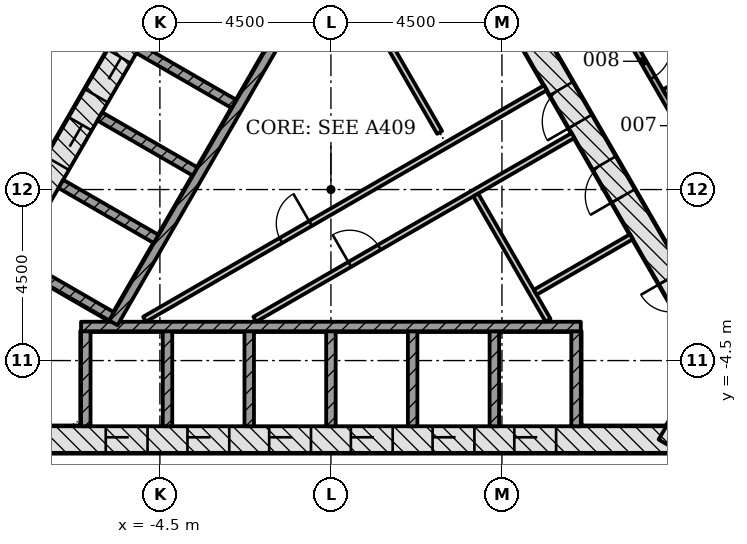
"""IFC4 building model, lengths in metres.
Left out: names, types, materials, properties, quantities, classifications, styles, units other than length and angle.
Written with IfcOpenShell. Run it as: python <this file> out.ifc"""

import sys

from ifc_helpers import new_model, si_unit, direction, frame, frame_2d, origin, place, context, subcontext, project, spatial, rectangle, extrude, element, fill, save


model = new_model("IFC4")
c1 = context("Model", 3, precision=1e-05, world=origin(), true_north=direction((0.0, 1.0)))
c2 = subcontext(c1, "Body", "Model", "MODEL_VIEW")
j1 = project(units=[si_unit("LENGTHUNIT", "METRE"), si_unit("PLANEANGLEUNIT", "RADIAN")], contexts=[c1])
p1 = place(None, origin())
s1 = spatial("IfcSite", under=j1, at=p1, CompositionType="ELEMENT")
p2 = place(p1, origin())
s2 = spatial("IfcBuilding", under=s1, at=p2, CompositionType="ELEMENT")
p3 = place(p2, frame((0.0, 0.0, 58.2)))
s3 = spatial("IfcBuildingStorey", under=s2, at=p3, CompositionType="ELEMENT", Elevation=58.2)
p4 = place(p3, frame((-9.229, -6.578, -0.2), z_axis=(0.0, 0.0, 1.0), x_axis=(1.0, 0.0, 0.0)))
e1 = element("IfcWall", 1, at=p4, inside=s3, PredefinedType="SHEAR", context=c2, shape_type="SweptSolid", body=[
    extrude(rectangle(XDim=18.458, YDim=0.7, at=frame_2d((9.229, 0.0))), origin(), (0.0, 0.0, 1.0), 3.6),
])
p5 = place(p4, frame((3.304, 0.0, 0.2)))
e2 = element("IfcOpeningElement", 2, at=p5, cuts=e1, PredefinedType="OPENING", context=c2, shape_type="SweptSolid", body=[
    extrude(rectangle(XDim=1.1, YDim=2.1, at=frame_2d((0.55, 1.05))), frame((0.0, 0.36, 0.0), z_axis=(0.0, -1.0, 0.0), x_axis=(1.0, 0.0, 0.0)), (0.0, 0.0, 1.0), 0.72),
])
p6 = place(p4, frame((5.454, 0.0, 0.2)))
e3 = element("IfcOpeningElement", 3, at=p6, cuts=e1, PredefinedType="OPENING", context=c2, shape_type="SweptSolid", body=[
    extrude(rectangle(XDim=1.1, YDim=2.1, at=frame_2d((0.55, 1.05))), frame((0.0, 0.36, 0.0), z_axis=(0.0, -1.0, 0.0), x_axis=(1.0, 0.0, 0.0)), (0.0, 0.0, 1.0), 0.72),
])
p7 = place(p4, frame((7.604, 0.0, 0.2)))
e4 = element("IfcOpeningElement", 4, at=p7, cuts=e1, PredefinedType="OPENING", context=c2, shape_type="SweptSolid", body=[
    extrude(rectangle(XDim=1.1, YDim=2.1, at=frame_2d((0.55, 1.05))), frame((0.0, 0.36, 0.0), z_axis=(0.0, -1.0, 0.0), x_axis=(1.0, 0.0, 0.0)), (0.0, 0.0, 1.0), 0.72),
])
p8 = place(p4, frame((9.754, 0.0, 0.2)))
e5 = element("IfcOpeningElement", 5, at=p8, cuts=e1, PredefinedType="OPENING", context=c2, shape_type="SweptSolid", body=[
    extrude(rectangle(XDim=1.1, YDim=2.1, at=frame_2d((0.55, 1.05))), frame((0.0, 0.36, 0.0), z_axis=(0.0, -1.0, 0.0), x_axis=(1.0, 0.0, 0.0)), (0.0, 0.0, 1.0), 0.72),
])
p9 = place(p4, frame((11.904, 0.0, 0.2)))
e6 = element("IfcOpeningElement", 6, at=p9, cuts=e1, PredefinedType="OPENING", context=c2, shape_type="SweptSolid", body=[
    extrude(rectangle(XDim=1.1, YDim=2.1, at=frame_2d((0.55, 1.05))), frame((0.0, 0.36, 0.0), z_axis=(0.0, -1.0, 0.0), x_axis=(1.0, 0.0, 0.0)), (0.0, 0.0, 1.0), 0.72),
])
p10 = place(p4, frame((14.054, 0.0, 0.2)))
e7 = element("IfcOpeningElement", 7, at=p10, cuts=e1, PredefinedType="OPENING", context=c2, shape_type="SweptSolid", body=[
    extrude(rectangle(XDim=1.1, YDim=2.1, at=frame_2d((0.55, 1.05))), frame((0.0, 0.36, 0.0), z_axis=(0.0, -1.0, 0.0), x_axis=(1.0, 0.0, 0.0)), (0.0, 0.0, 1.0), 0.72),
])
p11 = place(p4, frame((0.926, 0.0, 0.2)))
e8 = element("IfcOpeningElement", 8, at=p11, cuts=e1, PredefinedType="OPENING", context=c2, shape_type="SweptSolid", body=[
    extrude(rectangle(XDim=0.9, YDim=2.1, at=frame_2d((0.45, 1.05))), frame((0.0, 0.36, 0.0), z_axis=(0.0, -1.0, 0.0), x_axis=(1.0, 0.0, 0.0)), (0.0, 0.0, 1.0), 0.72),
])
p12 = place(p3, frame((8.926, -6.753, -0.2), z_axis=(0.0, 0.0, 1.0), x_axis=(0.500042739161, 0.866000726912, 0.0)))
e9 = element("IfcWall", 9, at=p12, inside=s3, PredefinedType="SHEAR", context=c2, shape_type="SweptSolid", body=[
    extrude(rectangle(XDim=2.771, YDim=0.7, at=frame_2d((1.386, 0.0))), origin(), (0.0, 0.0, 1.0), 3.6),
])
p13 = place(p3, frame((10.311, -4.703, -0.2), z_axis=(0.0, 0.0, 1.0), x_axis=(-0.500001446645, 0.866024568562, 0.0)))
e10 = element("IfcWall", 10, at=p13, inside=s3, PredefinedType="SHEAR", context=c2, shape_type="SweptSolid", body=[
    extrude(rectangle(XDim=18.458, YDim=0.7, at=frame_2d((9.229, 0.0))), origin(), (0.0, 0.0, 1.0), 3.6),
])
p14 = place(p13, frame((7.5, 0.0, 0.2)))
e11 = element("IfcOpeningElement", 11, at=p14, cuts=e10, PredefinedType="OPENING", context=c2, shape_type="SweptSolid", body=[
    extrude(rectangle(XDim=1.0, YDim=2.1, at=frame_2d((0.5, 1.05))), frame((0.0, 0.36, 0.0), z_axis=(0.0, -1.0, 0.0), x_axis=(1.0, 0.0, 0.0)), (0.0, 0.0, 1.0), 0.72),
])
p15 = place(p13, frame((1.852, 0.0, 0.2)))
e12 = element("IfcOpeningElement", 12, at=p15, cuts=e10, PredefinedType="OPENING", context=c2, shape_type="SweptSolid", body=[
    extrude(rectangle(XDim=0.9, YDim=2.1, at=frame_2d((0.45, 1.05))), frame((0.0, 0.36, 0.0), z_axis=(0.0, -1.0, 0.0), x_axis=(1.0, 0.0, 0.0)), (0.0, 0.0, 1.0), 0.72),
])
p16 = place(p13, frame((5.238, 0.0, 0.2)))
e13 = element("IfcOpeningElement", 13, at=p16, cuts=e10, PredefinedType="OPENING", context=c2, shape_type="SweptSolid", body=[
    extrude(rectangle(XDim=1.0, YDim=2.1, at=frame_2d((0.5, 1.05))), frame((0.0, 0.36, 0.0), z_axis=(0.0, -1.0, 0.0), x_axis=(1.0, 0.0, 0.0)), (0.0, 0.0, 1.0), 0.72),
])
p17 = place(p13, frame((13.63, 0.0, 0.2)))
e14 = element("IfcOpeningElement", 14, at=p17, cuts=e10, PredefinedType="OPENING", context=c2, shape_type="SweptSolid", body=[
    extrude(rectangle(XDim=0.9, YDim=2.1, at=frame_2d((0.45, 1.05))), frame((0.0, 0.36, 0.0), z_axis=(0.0, -1.0, 0.0), x_axis=(1.0, 0.0, 0.0)), (0.0, 0.0, 1.0), 0.72),
])
p18 = place(p3, frame((-1.083, 11.281, -0.2), z_axis=(0.0, 0.0, 1.0), x_axis=(-0.500001446645, -0.866024568562, 0.0)))
e15 = element("IfcWall", 15, at=p18, inside=s3, PredefinedType="SHEAR", context=c2, shape_type="SweptSolid", body=[
    extrude(rectangle(XDim=18.458, YDim=0.7, at=frame_2d((9.229, 0.0))), origin(), (0.0, 0.0, 1.0), 3.6),
])
p19 = place(p18, frame((8.979, 0.0, 0.2)))
e16 = element("IfcOpeningElement", 16, at=p19, cuts=e15, PredefinedType="OPENING", context=c2, shape_type="SweptSolid", body=[
    extrude(rectangle(XDim=1.2, YDim=2.1, at=frame_2d((0.6, 1.05))), frame((0.0, 0.36, 0.0), z_axis=(0.0, -1.0, 0.0), x_axis=(1.0, 0.0, 0.0)), (0.0, 0.0, 1.0), 0.72),
])
p20 = place(p18, frame((11.029, 0.0, 0.2)))
e17 = element("IfcOpeningElement", 17, at=p20, cuts=e15, PredefinedType="OPENING", context=c2, shape_type="SweptSolid", body=[
    extrude(rectangle(XDim=1.2, YDim=2.1, at=frame_2d((0.6, 1.05))), frame((0.0, 0.36, 0.0), z_axis=(0.0, -1.0, 0.0), x_axis=(1.0, 0.0, 0.0)), (0.0, 0.0, 1.0), 0.72),
])
for number, where, z_axis, x_axis in (
    (18, (-6.45, -6.228, -0.2), (0.0, 0.0, 1.0), (0.0, 1.0, 0.0)),
    (19, (-4.3, -6.228, -0.2), (0.0, 0.0, 1.0), (0.0, 1.0, 0.0)),
    (20, (-2.15, -6.228, -0.2), (0.0, 0.0, 1.0), (0.0, 1.0, 0.0)),
    (21, (0.0, -6.228, -0.2), (0.0, 0.0, 1.0), (0.0, 1.0, 0.0)),
    (22, (2.15, -6.228, -0.2), (0.0, 0.0, 1.0), (0.0, 1.0, 0.0)),
    (23, (4.3, -6.228, -0.2), (0.0, 0.0, 1.0), (0.0, 1.0, 0.0)),
    (24, (6.45, -6.228, -0.2), (0.0, 0.0, 1.0), (0.0, 1.0, 0.0)),
):
    element("IfcWall", number, at=place(p3, frame(where, z_axis=z_axis, x_axis=x_axis)), inside=s3, PredefinedType="PARTITIONING", context=c2, shape_type="SweptSolid", body=[
        extrude(rectangle(XDim=2.5, YDim=0.25, at=frame_2d((1.25, 0.0))), origin(), (0.0, 0.0, 1.0), 3.6),
    ])
p21 = place(p3, frame((-6.575, -3.603, 0.0), z_axis=(0.0, 0.0, 1.0), x_axis=(1.0, 0.0, 0.0)))
e25 = element("IfcWall", 25, at=p21, inside=s3, PredefinedType="PARTITIONING", context=c2, shape_type="SweptSolid", body=[
    extrude(rectangle(XDim=13.15, YDim=0.25, at=frame_2d((6.575, 0.0))), origin(), (0.0, 0.0, 1.0), 3.4),
])
for number, where, z_axis, x_axis in (
    (26, (-5.056, 3.699, -0.2), (0.0, 0.0, 1.0), (0.866, -0.5, 0.0)),
    (27, (-6.081, 1.923, -0.2), (0.0, 0.0, 1.0), (0.866, -0.5, 0.0)),
    (28, (-7.106, 0.148, -0.2), (0.0, 0.0, 1.0), (0.866, -0.5, 0.0)),
    (29, (-8.281, -1.887, -0.2), (0.0, 0.0, 1.0), (0.866, -0.5, 0.0)),
):
    element("IfcWall", number, at=place(p3, frame(where, z_axis=z_axis, x_axis=x_axis)), inside=s3, PredefinedType="PARTITIONING", context=c2, shape_type="SweptSolid", body=[
        extrude(rectangle(XDim=2.9, YDim=0.25, at=frame_2d((1.45, 0.0))), origin(), (0.0, 0.0, 1.0), 3.6),
    ])
p22 = place(p3, frame((0.176, 6.711, 0.0), z_axis=(0.0, 0.0, 1.0), x_axis=(-0.500004227369, -0.866022963098, 0.0)))
e30 = element("IfcWall", 30, at=p22, inside=s3, PredefinedType="PARTITIONING", context=c2, shape_type="SweptSolid", body=[
    extrude(rectangle(XDim=11.8, YDim=0.25, at=frame_2d((5.9, 0.0))), origin(), (0.0, 0.0, 1.0), 3.4),
])
p23 = place(p3, frame((-4.904, -3.413, 0.0), z_axis=(0.0, 0.0, 1.0), x_axis=(0.866020716117, 0.500008119189, 0.0)))
e31 = element("IfcWall", 31, at=p23, inside=s3, PredefinedType="PARTITIONING", context=c2, shape_type="SweptSolid", body=[
    extrude(rectangle(XDim=12.182, YDim=0.15, at=frame_2d((6.091, 0.0))), origin(), (0.0, 0.0, 1.0), 3.4),
])
p24 = place(p23, frame((4.142, 0.0, 0.0)))
e32 = element("IfcOpeningElement", 32, at=p24, cuts=e31, PredefinedType="OPENING", context=c2, shape_type="SweptSolid", body=[
    extrude(rectangle(XDim=0.9, YDim=2.1, at=frame_2d((0.45, 1.05))), frame((0.0, 0.085, 0.0), z_axis=(0.0, -1.0, 0.0), x_axis=(1.0, 0.0, 0.0)), (0.0, 0.0, 1.0), 0.17),
])
p25 = place(p3, frame((-2.004, -3.413, 0.0), z_axis=(0.0, 0.0, 1.0), x_axis=(0.866030034802, 0.499991978756, 0.0)))
e33 = element("IfcWall", 33, at=p25, inside=s3, PredefinedType="PARTITIONING", context=c2, shape_type="SweptSolid", body=[
    extrude(rectangle(XDim=9.671, YDim=0.15, at=frame_2d((4.835, 0.0))), origin(), (0.0, 0.0, 1.0), 3.4),
])
p26 = place(p25, frame((2.886, 0.0, 0.0)))
e34 = element("IfcOpeningElement", 34, at=p26, cuts=e33, PredefinedType="OPENING", context=c2, shape_type="SweptSolid", body=[
    extrude(rectangle(XDim=0.9, YDim=2.1, at=frame_2d((0.45, 1.05))), frame((0.0, 0.085, 0.0), z_axis=(0.0, -1.0, 0.0), x_axis=(1.0, 0.0, 0.0)), (0.0, 0.0, 1.0), 0.17),
])
p27 = place(p3, frame((2.86, 1.503, 0.0), z_axis=(0.0, 0.0, 1.0), x_axis=(-0.500014382217, 0.866017100048, 0.0)))
e35 = element("IfcWall", 35, at=p27, inside=s3, PredefinedType="PARTITIONING", context=c2, shape_type="SweptSolid", body=[
    extrude(rectangle(XDim=5.502, YDim=0.15, at=frame_2d((2.751, 0.0))), origin(), (0.0, 0.0, 1.0), 3.4),
])
p28 = place(p3, frame((5.713, -3.439, 0.0), z_axis=(0.0, 0.0, 1.0), x_axis=(-0.499981559197, 0.866036050325, 0.0)))
e36 = element("IfcWall", 36, at=p28, inside=s3, PredefinedType="PARTITIONING", context=c2, shape_type="SweptSolid", body=[
    extrude(rectangle(XDim=3.806, YDim=0.15, at=frame_2d((1.903, 0.0))), origin(), (0.0, 0.0, 1.0), 3.4),
])
p29 = place(p3, frame((5.375, -2.703, 0.0), z_axis=(0.0, 0.0, 1.0), x_axis=(0.866046596414, 0.499963291492, 0.0)))
e37 = element("IfcWall", 37, at=p29, inside=s3, PredefinedType="PARTITIONING", context=c2, shape_type="SweptSolid", body=[
    extrude(rectangle(XDim=2.925, YDim=0.15, at=frame_2d((1.462, 0.0))), origin(), (0.0, 0.0, 1.0), 3.4),
])
p30 = place(p3, frame((7.44, -10.226, -0.2), z_axis=(0.0, 0.0, 1.0), x_axis=(0.500022077904, 0.866012656725, 0.0)))
e38 = element("IfcWall", 38, at=p30, inside=s3, PredefinedType="SHEAR", context=c2, shape_type="SweptSolid", body=[
    extrude(rectangle(XDim=3.55, YDim=0.2, at=frame_2d((1.775, 0.0))), origin(), (0.0, 0.0, 1.0), 3.6),
])
p31 = place(p30, frame((1.175, 0.0, 0.2)))
e39 = element("IfcOpeningElement", 39, at=p31, cuts=e38, PredefinedType="OPENING", context=c2, shape_type="SweptSolid", body=[
    extrude(rectangle(XDim=1.2, YDim=2.1, at=frame_2d((0.6, 1.05))), frame((0.0, 0.11, 0.0), z_axis=(0.0, -1.0, 0.0), x_axis=(1.0, 0.0, 0.0)), (0.0, 0.0, 1.0), 0.22),
])
p32 = place(p3, frame((-16.169, -3.099, 0.0), z_axis=(0.0, 0.0, 1.0), x_axis=(0.499999805269, 0.866025516212, 0.0)))
e40 = element("IfcWall", 40, at=p32, inside=s3, PredefinedType="PARTITIONING", context=c2, shape_type="SweptSolid", body=[
    extrude(rectangle(XDim=22.097, YDim=0.15, at=frame_2d((11.049, 0.0))), origin(), (0.0, 0.0, 1.0), 2.778),
])
p33 = place(p32, frame((15.558, 0.0, 0.0)))
e41 = element("IfcOpeningElement", 41, at=p33, cuts=e40, PredefinedType="OPENING", context=c2, shape_type="SweptSolid", body=[
    extrude(rectangle(XDim=1.0, YDim=2.1, at=frame_2d((0.5, 1.05))), frame((0.0, 0.085, 0.0), z_axis=(0.0, -1.0, 0.0), x_axis=(1.0, 0.0, 0.0)), (0.0, 0.0, 1.0), 0.17),
])
p34 = place(p32, frame((12.976, 0.0, 0.0)))
e42 = element("IfcOpeningElement", 42, at=p34, cuts=e40, PredefinedType="OPENING", context=c2, shape_type="SweptSolid", body=[
    extrude(rectangle(XDim=1.0, YDim=2.1, at=frame_2d((0.5, 1.05))), frame((0.0, 0.085, 0.0), z_axis=(0.0, -1.0, 0.0), x_axis=(1.0, 0.0, 0.0)), (0.0, 0.0, 1.0), 0.17),
])
p35 = place(p32, frame((9.635, 0.0, 0.0)))
e43 = element("IfcOpeningElement", 43, at=p35, cuts=e40, PredefinedType="OPENING", context=c2, shape_type="SweptSolid", body=[
    extrude(rectangle(XDim=1.5, YDim=2.1, at=frame_2d((0.75, 1.05))), frame((0.0, 0.085, 0.0), z_axis=(0.0, -1.0, 0.0), x_axis=(1.0, 0.0, 0.0)), (0.0, 0.0, 1.0), 0.17),
])
p36 = place(p32, frame((3.404, 0.0, 0.0)))
e44 = element("IfcOpeningElement", 44, at=p36, cuts=e40, PredefinedType="OPENING", context=c2, shape_type="SweptSolid", body=[
    extrude(rectangle(XDim=1.5, YDim=2.1, at=frame_2d((0.75, 1.05))), frame((0.0, 0.085, 0.0), z_axis=(0.0, -1.0, 0.0), x_axis=(1.0, 0.0, 0.0)), (0.0, 0.0, 1.0), 0.17),
])
p37 = place(p3, frame((-4.407, 13.374, 0.0), z_axis=(0.0, 0.0, 1.0), x_axis=(-0.499997181693, -0.866027030928, 0.0)))
e45 = element("IfcWall", 45, at=p37, inside=s3, PredefinedType="PARTITIONING", context=c2, shape_type="SweptSolid", body=[
    extrude(rectangle(XDim=16.77, YDim=0.15, at=frame_2d((8.385, 0.0))), origin(), (0.0, 0.0, 1.0), 2.778),
])
p38 = place(p37, frame((8.879, 0.0, 0.0)))
e46 = element("IfcOpeningElement", 46, at=p38, cuts=e45, PredefinedType="OPENING", context=c2, shape_type="SweptSolid", body=[
    extrude(rectangle(XDim=1.0, YDim=2.1, at=frame_2d((0.5, 1.05))), frame((0.0, 0.085, 0.0), z_axis=(0.0, -1.0, 0.0), x_axis=(1.0, 0.0, 0.0)), (0.0, 0.0, 1.0), 0.17),
])
p39 = place(p3, frame((5.289, 8.446, 0.0), z_axis=(0.0, 0.0, 1.0), x_axis=(0.499996620721, -0.866027354803, 0.0)))
e47 = element("IfcWall", 47, at=p39, inside=s3, PredefinedType="PARTITIONING", context=c2, shape_type="SweptSolid", body=[
    extrude(rectangle(XDim=15.057, YDim=0.15, at=frame_2d((7.528, 0.0))), origin(), (0.0, 0.0, 1.0), 2.778),
])
p40 = place(p39, frame((12.563, 0.0, 0.0)))
e48 = element("IfcOpeningElement", 48, at=p40, cuts=e47, PredefinedType="OPENING", context=c2, shape_type="SweptSolid", body=[
    extrude(rectangle(XDim=1.0, YDim=2.1, at=frame_2d((0.5, 1.05))), frame((0.0, 0.085, 0.0), z_axis=(0.0, -1.0, 0.0), x_axis=(1.0, 0.0, 0.0)), (0.0, 0.0, 1.0), 0.17),
])
p41 = place(p39, frame((7.312, 0.0, 0.0)))
e49 = element("IfcOpeningElement", 49, at=p41, cuts=e47, PredefinedType="OPENING", context=c2, shape_type="SweptSolid", body=[
    extrude(rectangle(XDim=1.0, YDim=2.1, at=frame_2d((0.5, 1.05))), frame((0.0, 0.085, 0.0), z_axis=(0.0, -1.0, 0.0), x_axis=(1.0, 0.0, 0.0)), (0.0, 0.0, 1.0), 0.17),
])
p42 = place(p39, frame((5.356, 0.0, 0.0)))
e50 = element("IfcOpeningElement", 50, at=p42, cuts=e47, PredefinedType="OPENING", context=c2, shape_type="SweptSolid", body=[
    extrude(rectangle(XDim=1.0, YDim=2.1, at=frame_2d((0.5, 1.05))), frame((0.0, 0.085, 0.0), z_axis=(0.0, -1.0, 0.0), x_axis=(1.0, 0.0, 0.0)), (0.0, 0.0, 1.0), 0.17),
])
p43 = place(p3, frame((15.969, 6.63, 0.0), z_axis=(0.0, 0.0, 1.0), x_axis=(-0.870767403572, -0.491695158484, 0.0)))
e51 = element("IfcWall", 51, at=p43, inside=s3, PredefinedType="PARTITIONING", context=c2, shape_type="SweptSolid", body=[
    extrude(rectangle(XDim=8.266, YDim=0.15, at=frame_2d((4.133, 0.0))), origin(), (0.0, 0.0, 1.0), 2.778),
])
p44 = place(p5, origin())
e52 = element("IfcDoor", 52, at=p44, inside=s3, OperationType="DOUBLE_DOOR_SLIDING", PredefinedType="DOOR", context=c2, shape_type="SweptSolid", body=[
    extrude(rectangle(XDim=1.1, YDim=2.1, at=frame_2d((0.55, 1.05))), frame((0.0, 0.025, 0.0), z_axis=(0.0, -1.0, 0.0), x_axis=(1.0, 0.0, 0.0)), (0.0, 0.0, 1.0), 0.05),
])
fill(e2, e52)
p45 = place(p6, origin())
e53 = element("IfcDoor", 53, at=p45, inside=s3, OperationType="DOUBLE_DOOR_SLIDING", PredefinedType="DOOR", context=c2, shape_type="SweptSolid", body=[
    extrude(rectangle(XDim=1.1, YDim=2.1, at=frame_2d((0.55, 1.05))), frame((0.0, 0.025, 0.0), z_axis=(0.0, -1.0, 0.0), x_axis=(1.0, 0.0, 0.0)), (0.0, 0.0, 1.0), 0.05),
])
fill(e3, e53)
p46 = place(p7, origin())
e54 = element("IfcDoor", 54, at=p46, inside=s3, OperationType="DOUBLE_DOOR_SLIDING", PredefinedType="DOOR", context=c2, shape_type="SweptSolid", body=[
    extrude(rectangle(XDim=1.1, YDim=2.1, at=frame_2d((0.55, 1.05))), frame((0.0, 0.025, 0.0), z_axis=(0.0, -1.0, 0.0), x_axis=(1.0, 0.0, 0.0)), (0.0, 0.0, 1.0), 0.05),
])
fill(e4, e54)
p47 = place(p8, origin())
e55 = element("IfcDoor", 55, at=p47, inside=s3, OperationType="DOUBLE_DOOR_SLIDING", PredefinedType="DOOR", context=c2, shape_type="SweptSolid", body=[
    extrude(rectangle(XDim=1.1, YDim=2.1, at=frame_2d((0.55, 1.05))), frame((0.0, 0.025, 0.0), z_axis=(0.0, -1.0, 0.0), x_axis=(1.0, 0.0, 0.0)), (0.0, 0.0, 1.0), 0.05),
])
fill(e5, e55)
p48 = place(p9, origin())
e56 = element("IfcDoor", 56, at=p48, inside=s3, OperationType="DOUBLE_DOOR_SLIDING", PredefinedType="DOOR", context=c2, shape_type="SweptSolid", body=[
    extrude(rectangle(XDim=1.1, YDim=2.1, at=frame_2d((0.55, 1.05))), frame((0.0, 0.025, 0.0), z_axis=(0.0, -1.0, 0.0), x_axis=(1.0, 0.0, 0.0)), (0.0, 0.0, 1.0), 0.05),
])
fill(e6, e56)
p49 = place(p10, origin())
e57 = element("IfcDoor", 57, at=p49, inside=s3, OperationType="DOUBLE_DOOR_SLIDING", PredefinedType="DOOR", context=c2, shape_type="SweptSolid", body=[
    extrude(rectangle(XDim=1.1, YDim=2.1, at=frame_2d((0.55, 1.05))), frame((0.0, 0.025, 0.0), z_axis=(0.0, -1.0, 0.0), x_axis=(1.0, 0.0, 0.0)), (0.0, 0.0, 1.0), 0.05),
])
fill(e7, e57)
p50 = place(p19, origin())
e58 = element("IfcDoor", 58, at=p50, inside=s3, OperationType="DOUBLE_DOOR_SLIDING", PredefinedType="DOOR", context=c2, shape_type="SweptSolid", body=[
    extrude(rectangle(XDim=1.2, YDim=2.1, at=frame_2d((0.6, 1.05))), frame((0.0, 0.025, 0.0), z_axis=(0.0, -1.0, 0.0), x_axis=(1.0, 0.0, 0.0)), (0.0, 0.0, 1.0), 0.05),
])
fill(e16, e58)
p51 = place(p20, origin())
e59 = element("IfcDoor", 59, at=p51, inside=s3, OperationType="DOUBLE_DOOR_SLIDING", PredefinedType="DOOR", context=c2, shape_type="SweptSolid", body=[
    extrude(rectangle(XDim=1.2, YDim=2.1, at=frame_2d((0.6, 1.05))), frame((0.0, 0.025, 0.0), z_axis=(0.0, -1.0, 0.0), x_axis=(1.0, 0.0, 0.0)), (0.0, 0.0, 1.0), 0.05),
])
fill(e17, e59)
p52 = place(p14, origin())
e60 = element("IfcDoor", 60, at=p52, inside=s3, OperationType="SINGLE_SWING_LEFT", PredefinedType="DOOR", context=c2, shape_type="SweptSolid", body=[
    extrude(rectangle(XDim=1.0, YDim=2.1, at=frame_2d((0.5, 1.05))), frame((0.0, 0.075, 0.0), z_axis=(0.0, -1.0, 0.0), x_axis=(1.0, 0.0, 0.0)), (0.0, 0.0, 1.0), 0.15),
])
fill(e11, e60)
p53 = place(p15, origin())
e61 = element("IfcDoor", 61, at=p53, inside=s3, OperationType="SINGLE_SWING_RIGHT", PredefinedType="DOOR", context=c2, shape_type="SweptSolid", body=[
    extrude(rectangle(XDim=0.9, YDim=2.1, at=frame_2d((0.45, 1.05))), frame((0.0, 0.075, 0.0), z_axis=(0.0, -1.0, 0.0), x_axis=(1.0, 0.0, 0.0)), (0.0, 0.0, 1.0), 0.15),
])
fill(e12, e61)
p54 = place(p16, origin())
e62 = element("IfcDoor", 62, at=p54, inside=s3, OperationType="SINGLE_SWING_LEFT", PredefinedType="DOOR", context=c2, shape_type="SweptSolid", body=[
    extrude(rectangle(XDim=1.0, YDim=2.1, at=frame_2d((0.5, 1.05))), frame((0.0, 0.075, 0.0), z_axis=(0.0, -1.0, 0.0), x_axis=(1.0, 0.0, 0.0)), (0.0, 0.0, 1.0), 0.15),
])
fill(e13, e62)
p55 = place(p26, origin())
e63 = element("IfcDoor", 63, at=p55, inside=s3, OperationType="SINGLE_SWING_LEFT", PredefinedType="DOOR", context=c2, shape_type="SweptSolid", body=[
    extrude(rectangle(XDim=0.9, YDim=2.1, at=frame_2d((0.45, 1.05))), frame((0.0, 0.025, 0.0), z_axis=(0.0, -1.0, 0.0), x_axis=(1.0, 0.0, 0.0)), (0.0, 0.0, 1.0), 0.05),
])
fill(e34, e63)
p56 = place(p24, origin())
e64 = element("IfcDoor", 64, at=p56, inside=s3, OperationType="SINGLE_SWING_RIGHT", PredefinedType="DOOR", context=c2, shape_type="SweptSolid", body=[
    extrude(rectangle(XDim=0.9, YDim=2.1, at=frame_2d((0.45, 1.05))), frame((0.0, 0.025, 0.0), z_axis=(0.0, -1.0, 0.0), x_axis=(1.0, 0.0, 0.0)), (0.0, 0.0, 1.0), 0.05),
])
fill(e32, e64)
p57 = place(p42, origin())
e65 = element("IfcDoor", 65, at=p57, inside=s3, OperationType="SINGLE_SWING_LEFT", PredefinedType="DOOR", context=c2, shape_type="SweptSolid", body=[
    extrude(rectangle(XDim=1.0, YDim=2.1, at=frame_2d((0.5, 1.05))), frame((0.0, 0.025, 0.0), z_axis=(0.0, -1.0, 0.0), x_axis=(1.0, 0.0, 0.0)), (0.0, 0.0, 1.0), 0.05),
])
fill(e50, e65)
save(model, sys.argv[1])
